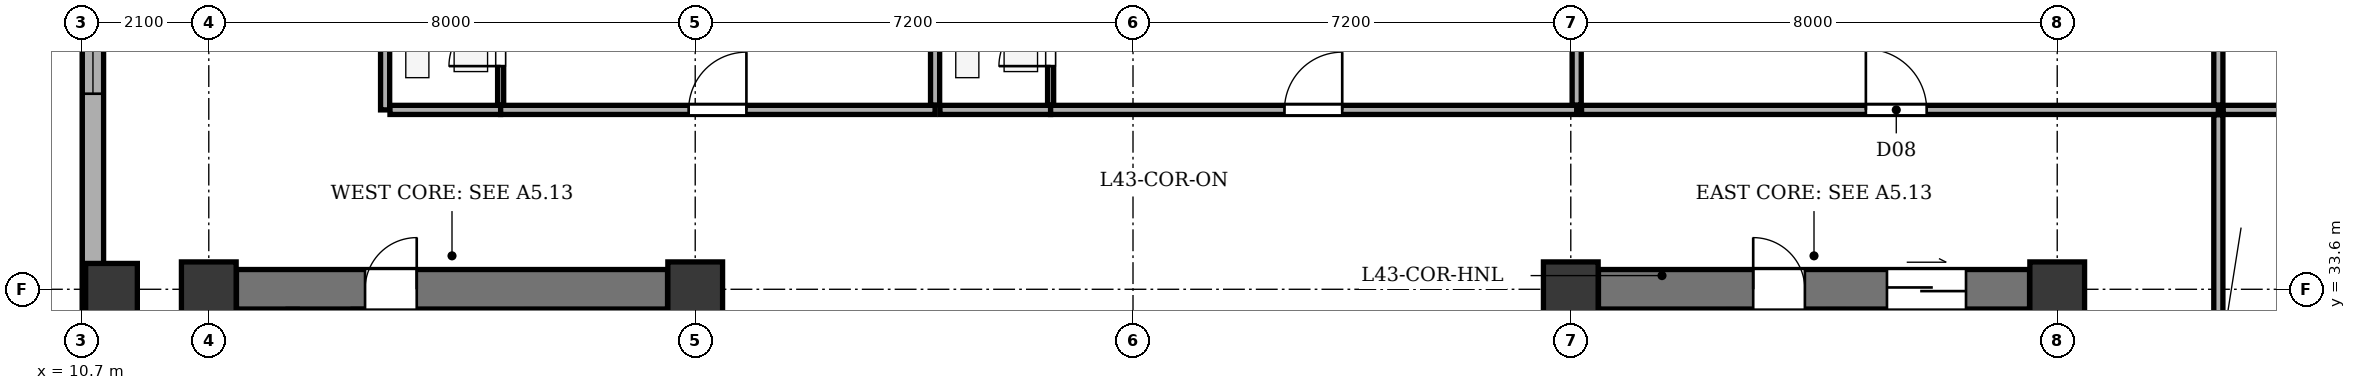
"""IFC4 building model, lengths in metres.
Left out: names, types, materials, properties, quantities, classifications, styles, units other than length and angle.
Written with IfcOpenShell. Run it as: python <this file> out.ifc"""

import sys

from ifc_helpers import new_model, si_unit, direction, frame, frame_2d, origin, origin_2d, place, context, subcontext, project, spatial, rectangle, extrude, element, fill, save


model = new_model("IFC4")
c1 = context("Model", 3, precision=1e-05, world=origin(), true_north=direction((0.0, 1.0)))
c2 = subcontext(c1, "Body", "Model", "MODEL_VIEW")
j1 = project(units=[si_unit("LENGTHUNIT", "METRE"), si_unit("PLANEANGLEUNIT", "RADIAN")], contexts=[c1])
p1 = place(None, origin())
s1 = spatial("IfcSite", under=j1, at=p1, CompositionType="ELEMENT")
p2 = place(p1, origin())
s2 = spatial("IfcBuilding", under=s1, at=p2, CompositionType="ELEMENT")
p3 = place(p2, frame((0.0, 0.0, 169.3)))
s3 = spatial("IfcBuildingStorey", under=s2, at=p3, CompositionType="ELEMENT", Elevation=169.3)
for number, where, z_axis, x_axis in (
    (1, (12.8, 33.6, 0.0), (0.0, 0.0, 1.0), (1.0, 0.0, 0.0)),
    (2, (20.8, 33.6, 0.0), (0.0, 0.0, 1.0), (1.0, 0.0, 0.0)),
    (3, (35.2, 33.6, 0.0), (0.0, 0.0, 1.0), (1.0, 0.0, 0.0)),
    (4, (43.2, 33.6, 0.0), (0.0, 0.0, 1.0), (1.0, 0.0, 0.0)),
):
    element("IfcColumn", number, at=place(p3, frame(where, z_axis=z_axis, x_axis=x_axis)), inside=s3, PredefinedType="COLUMN", context=c2, shape_type="SweptSolid", body=[
        extrude(rectangle(XDim=0.9, YDim=0.9, at=origin_2d()), origin(), (0.0, 0.0, 1.0), 3.5),
    ])
p4 = place(p3, frame((11.2, 33.6, 0.0), z_axis=(0.0, 0.0, 1.0), x_axis=(1.0, 0.0, 0.0)))
e5 = element("IfcColumn", 5, at=p4, inside=s3, PredefinedType="COLUMN", context=c2, shape_type="SweptSolid", body=[
    extrude(rectangle(XDim=0.85, YDim=0.85, at=origin_2d()), origin(), (0.0, 0.0, 1.0), 3.5),
])
p5 = place(p3, frame((10.895, 12.9, 0.0), z_axis=(0.0, 0.0, 1.0), x_axis=(0.0, 1.0, 0.0)))
e6 = element("IfcWall", 6, at=p5, inside=s3, PredefinedType="STANDARD", context=c2, shape_type="SweptSolid", body=[
    extrude(rectangle(XDim=35.0, YDim=0.35, at=frame_2d((17.5, 0.0))), origin(), (0.0, 0.0, 1.0), 2.785),
])
p6 = place(p5, frame((1.652, 0.0, 0.75)))
e7 = element("IfcOpeningElement", 7, at=p6, cuts=e6, PredefinedType="OPENING", context=c2, shape_type="SweptSolid", body=[
    extrude(rectangle(XDim=1.6, YDim=1.75, at=frame_2d((0.8, 0.875))), frame((0.0, 0.185, 0.0), z_axis=(0.0, -1.0, 0.0), x_axis=(1.0, 0.0, 0.0)), (0.0, 0.0, 1.0), 0.37),
])
p7 = place(p5, frame((4.748, 0.0, 0.75)))
e8 = element("IfcOpeningElement", 8, at=p7, cuts=e6, PredefinedType="OPENING", context=c2, shape_type="SweptSolid", body=[
    extrude(rectangle(XDim=1.6, YDim=1.75, at=frame_2d((0.8, 0.875))), frame((0.0, 0.185, 0.0), z_axis=(0.0, -1.0, 0.0), x_axis=(1.0, 0.0, 0.0)), (0.0, 0.0, 1.0), 0.37),
])
p8 = place(p5, frame((10.752, 0.0, 0.75)))
e9 = element("IfcOpeningElement", 9, at=p8, cuts=e6, PredefinedType="OPENING", context=c2, shape_type="SweptSolid", body=[
    extrude(rectangle(XDim=1.6, YDim=1.75, at=frame_2d((0.8, 0.875))), frame((0.0, 0.185, 0.0), z_axis=(0.0, -1.0, 0.0), x_axis=(1.0, 0.0, 0.0)), (0.0, 0.0, 1.0), 0.37),
])
p9 = place(p5, frame((15.998, 0.0, 0.75)))
e10 = element("IfcOpeningElement", 10, at=p9, cuts=e6, PredefinedType="OPENING", context=c2, shape_type="SweptSolid", body=[
    extrude(rectangle(XDim=2.1, YDim=1.75, at=frame_2d((1.05, 0.875))), frame((0.0, 0.185, 0.0), z_axis=(0.0, -1.0, 0.0), x_axis=(1.0, 0.0, 0.0)), (0.0, 0.0, 1.0), 0.37),
])
p10 = place(p5, frame((23.916, 0.0, 0.75)))
e11 = element("IfcOpeningElement", 11, at=p10, cuts=e6, PredefinedType="OPENING", context=c2, shape_type="SweptSolid", body=[
    extrude(rectangle(XDim=1.6, YDim=1.75, at=frame_2d((0.8, 0.875))), frame((0.0, 0.185, 0.0), z_axis=(0.0, -1.0, 0.0), x_axis=(1.0, 0.0, 0.0)), (0.0, 0.0, 1.0), 0.37),
])
p11 = place(p5, frame((29.834, 0.0, 0.75)))
e12 = element("IfcOpeningElement", 12, at=p11, cuts=e6, PredefinedType="OPENING", context=c2, shape_type="SweptSolid", body=[
    extrude(rectangle(XDim=2.1, YDim=1.75, at=frame_2d((1.05, 0.875))), frame((0.0, 0.185, 0.0), z_axis=(0.0, -1.0, 0.0), x_axis=(1.0, 0.0, 0.0)), (0.0, 0.0, 1.0), 0.37),
])
p12 = place(p3, frame((13.255, 33.6, 0.0), z_axis=(0.0, 0.0, 1.0), x_axis=(1.0, 0.0, 0.0)))
e13 = element("IfcWall", 13, at=p12, inside=s3, PredefinedType="SHEAR", context=c2, shape_type="SweptSolid", body=[
    extrude(rectangle(XDim=7.09, YDim=0.65, at=frame_2d((3.545, 0.0))), origin(), (0.0, 0.0, 1.0), 3.2),
])
p13 = place(p12, frame((2.115, 0.0, 0.0)))
e14 = element("IfcOpeningElement", 14, at=p13, cuts=e13, PredefinedType="OPENING", context=c2, shape_type="SweptSolid", body=[
    extrude(rectangle(XDim=0.85, YDim=2.02, at=frame_2d((0.425, 1.01))), frame((0.0, 0.335, 0.0), z_axis=(0.0, -1.0, 0.0), x_axis=(1.0, 0.0, 0.0)), (0.0, 0.0, 1.0), 0.67),
])
p14 = place(p3, frame((16.435, 21.135, 0.0), z_axis=(0.0, 0.0, 1.0), x_axis=(0.0, 1.0, 0.0)))
e15 = element("IfcWall", 15, at=p14, inside=s3, PredefinedType="SHEAR", context=c2, shape_type="SweptSolid", body=[
    extrude(rectangle(XDim=12.13, YDim=0.25, at=frame_2d((6.065, 0.0))), origin(), (0.0, 0.0, 1.0), 3.2),
])
p15 = place(p14, frame((0.515, 0.0, 0.0)))
e16 = element("IfcOpeningElement", 16, at=p15, cuts=e15, PredefinedType="OPENING", context=c2, shape_type="SweptSolid", body=[
    extrude(rectangle(XDim=1.2, YDim=2.15, at=frame_2d((0.6, 1.075))), frame((0.0, 0.135, 0.0), z_axis=(0.0, -1.0, 0.0), x_axis=(1.0, 0.0, 0.0)), (0.0, 0.0, 1.0), 0.27),
])
p16 = place(p14, frame((2.665, 0.0, 0.0)))
e17 = element("IfcOpeningElement", 17, at=p16, cuts=e15, PredefinedType="OPENING", context=c2, shape_type="SweptSolid", body=[
    extrude(rectangle(XDim=1.15, YDim=2.15, at=frame_2d((0.575, 1.075))), frame((0.0, 0.135, 0.0), z_axis=(0.0, -1.0, 0.0), x_axis=(1.0, 0.0, 0.0)), (0.0, 0.0, 1.0), 0.27),
])
p17 = place(p3, frame((18.12, 31.17, 0.0), z_axis=(0.0, 0.0, 1.0), x_axis=(0.0, 1.0, 0.0)))
e18 = element("IfcWall", 18, at=p17, inside=s3, PredefinedType="PARTITIONING", context=c2, shape_type="SweptSolid", body=[
    extrude(rectangle(XDim=2.095, YDim=0.18, at=frame_2d((1.047, 0.0))), origin(), (0.0, 0.0, 1.0), 3.2),
])
p18 = place(p3, frame((35.655, 33.6, 0.0), z_axis=(0.0, 0.0, 1.0), x_axis=(1.0, 0.0, 0.0)))
e19 = element("IfcWall", 19, at=p18, inside=s3, PredefinedType="SHEAR", context=c2, shape_type="SweptSolid", body=[
    extrude(rectangle(XDim=7.09, YDim=0.65, at=frame_2d((3.545, 0.0))), origin(), (0.0, 0.0, 1.0), 3.2),
])
p19 = place(p18, frame((4.745, 0.0, 0.0)))
e20 = element("IfcOpeningElement", 20, at=p19, cuts=e19, PredefinedType="OPENING", context=c2, shape_type="SweptSolid", body=[
    extrude(rectangle(XDim=1.3, YDim=2.15, at=frame_2d((0.65, 1.075))), frame((0.0, 0.335, 0.0), z_axis=(0.0, -1.0, 0.0), x_axis=(1.0, 0.0, 0.0)), (0.0, 0.0, 1.0), 0.67),
])
p20 = place(p18, frame((2.545, 0.0, 0.0)))
e21 = element("IfcOpeningElement", 21, at=p20, cuts=e19, PredefinedType="OPENING", context=c2, shape_type="SweptSolid", body=[
    extrude(rectangle(XDim=0.85, YDim=2.02, at=frame_2d((0.425, 1.01))), frame((0.0, 0.335, 0.0), z_axis=(0.0, -1.0, 0.0), x_axis=(1.0, 0.0, 0.0)), (0.0, 0.0, 1.0), 0.67),
])
p21 = place(p3, frame((39.565, 21.135, 0.0), z_axis=(0.0, 0.0, 1.0), x_axis=(0.0, 1.0, 0.0)))
e22 = element("IfcWall", 22, at=p21, inside=s3, PredefinedType="SHEAR", context=c2, shape_type="SweptSolid", body=[
    extrude(rectangle(XDim=12.13, YDim=0.25, at=frame_2d((6.065, 0.0))), origin(), (0.0, 0.0, 1.0), 3.2),
])
p22 = place(p21, frame((0.515, 0.0, 0.0)))
e23 = element("IfcOpeningElement", 23, at=p22, cuts=e22, PredefinedType="OPENING", context=c2, shape_type="SweptSolid", body=[
    extrude(rectangle(XDim=1.2, YDim=2.15, at=frame_2d((0.6, 1.075))), frame((0.0, 0.135, 0.0), z_axis=(0.0, -1.0, 0.0), x_axis=(1.0, 0.0, 0.0)), (0.0, 0.0, 1.0), 0.27),
])
p23 = place(p21, frame((2.665, 0.0, 0.0)))
e24 = element("IfcOpeningElement", 24, at=p23, cuts=e22, PredefinedType="OPENING", context=c2, shape_type="SweptSolid", body=[
    extrude(rectangle(XDim=1.15, YDim=2.15, at=frame_2d((0.575, 1.075))), frame((0.0, 0.135, 0.0), z_axis=(0.0, -1.0, 0.0), x_axis=(1.0, 0.0, 0.0)), (0.0, 0.0, 1.0), 0.27),
])
p24 = place(p3, frame((37.9, 25.27, 0.0), z_axis=(0.0, 0.0, 1.0), x_axis=(0.0, 1.0, 0.0)))
e25 = element("IfcWall", 25, at=p24, inside=s3, PredefinedType="SOLIDWALL", context=c2, shape_type="SweptSolid", body=[
    extrude(rectangle(XDim=7.995, YDim=0.2, at=frame_2d((3.998, 0.0))), origin(), (0.0, 0.0, 1.0), 3.2),
])
p25 = place(p3, frame((14.18, 30.96, 0.0), z_axis=(0.0, 0.0, 1.0), x_axis=(0.0, 1.0, 0.0)))
e26 = element("IfcWall", 26, at=p25, inside=s3, PredefinedType="PARTITIONING", context=c2, shape_type="SweptSolid", body=[
    extrude(rectangle(XDim=2.31, YDim=0.15, at=frame_2d((1.155, 0.0))), origin(), (0.0, 0.0, 1.0), 3.2),
])
p26 = place(p25, frame((0.47, 0.0, 0.0)))
e27 = element("IfcOpeningElement", 27, at=p26, cuts=e26, PredefinedType="OPENING", context=c2, shape_type="SweptSolid", body=[
    extrude(rectangle(XDim=0.85, YDim=2.02, at=frame_2d((0.425, 1.01))), frame((0.0, 0.085, 0.0), z_axis=(0.0, -1.0, 0.0), x_axis=(1.0, 0.0, 0.0)), (0.0, 0.0, 1.0), 0.17),
])
p27 = place(p3, frame((15.25, 30.96, 0.0), z_axis=(0.0, 0.0, 1.0), x_axis=(0.0, 1.0, 0.0)))
e28 = element("IfcWall", 28, at=p27, inside=s3, PredefinedType="PARTITIONING", context=c2, shape_type="SweptSolid", body=[
    extrude(rectangle(XDim=2.31, YDim=0.15, at=frame_2d((1.155, 0.0))), origin(), (0.0, 0.0, 1.0), 3.2),
])
p28 = place(p27, frame((0.47, 0.0, 0.0)))
e29 = element("IfcOpeningElement", 29, at=p28, cuts=e28, PredefinedType="OPENING", context=c2, shape_type="SweptSolid", body=[
    extrude(rectangle(XDim=0.85, YDim=2.02, at=frame_2d((0.425, 1.01))), frame((0.0, 0.085, 0.0), z_axis=(0.0, -1.0, 0.0), x_axis=(1.0, 0.0, 0.0)), (0.0, 0.0, 1.0), 0.17),
])
p29 = place(p3, frame((15.7, 36.55, 0.0), z_axis=(0.0, 0.0, 1.0), x_axis=(0.0, 1.0, 0.0)))
e30 = element("IfcWall", 30, at=p29, inside=s3, PredefinedType="PARTITIONING", context=c2, shape_type="SweptSolid", body=[
    extrude(rectangle(XDim=15.975, YDim=0.15, at=frame_2d((7.987, 0.0))), origin(), (0.0, 0.0, 1.0), 3.2),
])
p30 = place(p3, frame((15.78, 36.55, 0.0), z_axis=(0.0, 0.0, 1.0), x_axis=(1.0, 0.0, 0.0)))
e31 = element("IfcWall", 31, at=p30, inside=s3, PredefinedType="PARTITIONING", context=c2, shape_type="SweptSolid", body=[
    extrude(rectangle(XDim=1.82, YDim=0.15, at=frame_2d((0.91, 0.0))), origin(), (0.0, 0.0, 1.0), 3.2),
])
p31 = place(p3, frame((17.6, 36.55, 0.0), z_axis=(0.0, 0.0, 1.0), x_axis=(1.0, 0.0, 0.0)))
e32 = element("IfcWall", 32, at=p31, inside=s3, PredefinedType="PARTITIONING", context=c2, shape_type="SweptSolid", body=[
    extrude(rectangle(XDim=7.145, YDim=0.15, at=frame_2d((3.573, 0.0))), origin(), (0.0, 0.0, 1.0), 3.2),
])
p32 = place(p31, frame((3.092, 0.0, 0.0)))
e33 = element("IfcOpeningElement", 33, at=p32, cuts=e32, PredefinedType="OPENING", context=c2, shape_type="SweptSolid", body=[
    extrude(rectangle(XDim=0.95, YDim=2.1, at=frame_2d((0.475, 1.05))), frame((0.0, 0.085, 0.0), z_axis=(0.0, -1.0, 0.0), x_axis=(1.0, 0.0, 0.0)), (0.0, 0.0, 1.0), 0.17),
])
p33 = place(p3, frame((17.6, 36.63, 0.0), z_axis=(0.0, 0.0, 1.0), x_axis=(0.0, 1.0, 0.0)))
e34 = element("IfcWall", 34, at=p33, inside=s3, PredefinedType="PARTITIONING", context=c2, shape_type="SweptSolid", body=[
    extrude(rectangle(XDim=2.25, YDim=0.1, at=frame_2d((1.125, 0.0))), origin(), (0.0, 0.0, 1.0), 3.2),
])
p34 = place(p33, frame((0.64, 0.0, 0.0)))
e35 = element("IfcOpeningElement", 35, at=p34, cuts=e34, PredefinedType="OPENING", context=c2, shape_type="SweptSolid", body=[
    extrude(rectangle(XDim=0.85, YDim=2.05, at=frame_2d((0.425, 1.025))), frame((0.0, 0.06, 0.0), z_axis=(0.0, -1.0, 0.0), x_axis=(1.0, 0.0, 0.0)), (0.0, 0.0, 1.0), 0.12),
])
p35 = place(p3, frame((24.745, 36.63, 0.0), z_axis=(0.0, 0.0, 1.0), x_axis=(0.0, 1.0, 0.0)))
e36 = element("IfcWall", 36, at=p35, inside=s3, PredefinedType="PARTITIONING", context=c2, shape_type="SweptSolid", body=[
    extrude(rectangle(XDim=15.895, YDim=0.15, at=frame_2d((7.948, 0.0))), origin(), (0.0, 0.0, 1.0), 3.2),
])
p36 = place(p3, frame((24.825, 36.55, 0.0), z_axis=(0.0, 0.0, 1.0), x_axis=(1.0, 0.0, 0.0)))
e37 = element("IfcWall", 37, at=p36, inside=s3, PredefinedType="PARTITIONING", context=c2, shape_type="SweptSolid", body=[
    extrude(rectangle(XDim=1.82, YDim=0.15, at=frame_2d((0.91, 0.0))), origin(), (0.0, 0.0, 1.0), 3.2),
])
p37 = place(p3, frame((26.645, 36.55, 0.0), z_axis=(0.0, 0.0, 1.0), x_axis=(1.0, 0.0, 0.0)))
e38 = element("IfcWall", 38, at=p37, inside=s3, PredefinedType="PARTITIONING", context=c2, shape_type="SweptSolid", body=[
    extrude(rectangle(XDim=8.652, YDim=0.15, at=frame_2d((4.326, 0.0))), origin(), (0.0, 0.0, 1.0), 3.2),
])
p38 = place(p37, frame((3.846, 0.0, 0.0)))
e39 = element("IfcOpeningElement", 39, at=p38, cuts=e38, PredefinedType="OPENING", context=c2, shape_type="SweptSolid", body=[
    extrude(rectangle(XDim=0.95, YDim=2.1, at=frame_2d((0.475, 1.05))), frame((0.0, 0.085, 0.0), z_axis=(0.0, -1.0, 0.0), x_axis=(1.0, 0.0, 0.0)), (0.0, 0.0, 1.0), 0.17),
])
p39 = place(p3, frame((26.645, 36.63, 0.0), z_axis=(0.0, 0.0, 1.0), x_axis=(0.0, 1.0, 0.0)))
e40 = element("IfcWall", 40, at=p39, inside=s3, PredefinedType="PARTITIONING", context=c2, shape_type="SweptSolid", body=[
    extrude(rectangle(XDim=2.25, YDim=0.1, at=frame_2d((1.125, 0.0))), origin(), (0.0, 0.0, 1.0), 3.2),
])
p40 = place(p39, frame((0.64, 0.0, 0.0)))
e41 = element("IfcOpeningElement", 41, at=p40, cuts=e40, PredefinedType="OPENING", context=c2, shape_type="SweptSolid", body=[
    extrude(rectangle(XDim=0.85, YDim=2.05, at=frame_2d((0.425, 1.025))), frame((0.0, 0.06, 0.0), z_axis=(0.0, -1.0, 0.0), x_axis=(1.0, 0.0, 0.0)), (0.0, 0.0, 1.0), 0.12),
])
p41 = place(p3, frame((35.297, 36.63, 0.0), z_axis=(0.0, 0.0, 1.0), x_axis=(0.0, 1.0, 0.0)))
e42 = element("IfcWall", 42, at=p41, inside=s3, PredefinedType="PARTITIONING", context=c2, shape_type="SweptSolid", body=[
    extrude(rectangle(XDim=15.895, YDim=0.15, at=frame_2d((7.948, 0.0))), origin(), (0.0, 0.0, 1.0), 2.535),
])
p42 = place(p3, frame((35.377, 36.55, 0.0), z_axis=(0.0, 0.0, 1.0), x_axis=(1.0, 0.0, 0.0)))
e43 = element("IfcWall", 43, at=p42, inside=s3, PredefinedType="PARTITIONING", context=c2, shape_type="SweptSolid", body=[
    extrude(rectangle(XDim=10.473, YDim=0.15, at=frame_2d((5.237, 0.0))), origin(), (0.0, 0.0, 1.0), 3.2),
])
p43 = place(p42, frame((4.676, 0.0, 0.0)))
e44 = element("IfcOpeningElement", 44, at=p43, cuts=e43, PredefinedType="OPENING", context=c2, shape_type="SweptSolid", body=[
    extrude(rectangle(XDim=1.0, YDim=2.1, at=frame_2d((0.5, 1.05))), frame((0.0, 0.085, 0.0), z_axis=(0.0, -1.0, 0.0), x_axis=(1.0, 0.0, 0.0)), (0.0, 0.0, 1.0), 0.17),
])
p44 = place(p3, frame((45.85, 36.63, 0.0), z_axis=(0.0, 0.0, 1.0), x_axis=(0.0, 1.0, 0.0)))
e45 = element("IfcWall", 45, at=p44, inside=s3, PredefinedType="PARTITIONING", context=c2, shape_type="SweptSolid", body=[
    extrude(rectangle(XDim=15.895, YDim=0.15, at=frame_2d((7.948, 0.0))), origin(), (0.0, 0.0, 1.0), 3.2),
])
p45 = place(p3, frame((45.93, 36.55, 0.0), z_axis=(0.0, 0.0, 1.0), x_axis=(1.0, 0.0, 0.0)))
e46 = element("IfcWall", 46, at=p45, inside=s3, PredefinedType="PARTITIONING", context=c2, shape_type="SweptSolid", body=[
    extrude(rectangle(XDim=9.395, YDim=0.15, at=frame_2d((4.698, 0.0))), origin(), (0.0, 0.0, 1.0), 3.2),
])
p46 = place(p3, frame((45.85, 17.93, 0.0), z_axis=(0.0, 0.0, 1.0), x_axis=(0.0, 1.0, 0.0)))
e47 = element("IfcWall", 47, at=p46, inside=s3, PredefinedType="PARTITIONING", context=c2, shape_type="SweptSolid", body=[
    extrude(rectangle(XDim=18.54, YDim=0.15, at=frame_2d((9.27, 0.0))), origin(), (0.0, 0.0, 1.0), 3.2),
])
p47 = place(p46, frame((8.79, 0.0, 0.0)))
e48 = element("IfcOpeningElement", 48, at=p47, cuts=e47, PredefinedType="OPENING", context=c2, shape_type="SweptSolid", body=[
    extrude(rectangle(XDim=0.95, YDim=2.1, at=frame_2d((0.475, 1.05))), frame((0.0, 0.085, 0.0), z_axis=(0.0, -1.0, 0.0), x_axis=(1.0, 0.0, 0.0)), (0.0, 0.0, 1.0), 0.17),
])
p48 = place(p10, origin())
e49 = element("IfcWindow", 49, at=p48, inside=s3, PartitioningType="SINGLE_PANEL", PredefinedType="WINDOW", context=c2, shape_type="SweptSolid", body=[
    extrude(rectangle(XDim=1.6, YDim=1.75, at=frame_2d((0.8, 0.875))), frame((0.0, -0.01, 0.0), z_axis=(0.0, -1.0, 0.0), x_axis=(1.0, 0.0, 0.0)), (0.0, 0.0, 1.0), 0.06),
])
fill(e11, e49)
p49 = place(p13, origin())
e50 = element("IfcDoor", 50, at=p49, inside=s3, OperationType="SINGLE_SWING_RIGHT", PredefinedType="DOOR", context=c2, shape_type="SweptSolid", body=[
    extrude(rectangle(XDim=0.85, YDim=2.02, at=frame_2d((0.425, 1.01))), frame((0.0, 0.025, 0.0), z_axis=(0.0, -1.0, 0.0), x_axis=(1.0, 0.0, 0.0)), (0.0, 0.0, 1.0), 0.05),
])
fill(e14, e50)
p50 = place(p19, origin())
e51 = element("IfcDoor", 51, at=p50, inside=s3, OperationType="DOUBLE_DOOR_SLIDING", PredefinedType="DOOR", context=c2, shape_type="SweptSolid", body=[
    extrude(rectangle(XDim=1.3, YDim=2.15, at=frame_2d((0.65, 1.075))), frame((0.0, 0.025, 0.0), z_axis=(0.0, -1.0, 0.0), x_axis=(1.0, 0.0, 0.0)), (0.0, 0.0, 1.0), 0.05),
])
fill(e20, e51)
p51 = place(p20, origin())
e52 = element("IfcDoor", 52, at=p51, inside=s3, OperationType="SINGLE_SWING_LEFT", PredefinedType="DOOR", context=c2, shape_type="SweptSolid", body=[
    extrude(rectangle(XDim=0.85, YDim=2.02, at=frame_2d((0.425, 1.01))), frame((0.0, 0.025, 0.0), z_axis=(0.0, -1.0, 0.0), x_axis=(1.0, 0.0, 0.0)), (0.0, 0.0, 1.0), 0.05),
])
fill(e21, e52)
p52 = place(p34, origin())
e53 = element("IfcDoor", 53, at=p52, inside=s3, OperationType="SINGLE_SWING_LEFT", PredefinedType="DOOR", context=c2, shape_type="SweptSolid", body=[
    extrude(rectangle(XDim=0.85, YDim=2.05, at=frame_2d((0.425, 1.025))), frame((0.0, 0.025, 0.0), z_axis=(0.0, -1.0, 0.0), x_axis=(1.0, 0.0, 0.0)), (0.0, 0.0, 1.0), 0.05),
])
fill(e35, e53)
p53 = place(p32, origin())
e54 = element("IfcDoor", 54, at=p53, inside=s3, OperationType="SINGLE_SWING_RIGHT", PredefinedType="DOOR", context=c2, shape_type="SweptSolid", body=[
    extrude(rectangle(XDim=0.95, YDim=2.1, at=frame_2d((0.475, 1.05))), frame((0.0, 0.025, 0.0), z_axis=(0.0, -1.0, 0.0), x_axis=(1.0, 0.0, 0.0)), (0.0, 0.0, 1.0), 0.05),
])
fill(e33, e54)
p54 = place(p40, origin())
e55 = element("IfcDoor", 55, at=p54, inside=s3, OperationType="SINGLE_SWING_LEFT", PredefinedType="DOOR", context=c2, shape_type="SweptSolid", body=[
    extrude(rectangle(XDim=0.85, YDim=2.05, at=frame_2d((0.425, 1.025))), frame((0.0, 0.025, 0.0), z_axis=(0.0, -1.0, 0.0), x_axis=(1.0, 0.0, 0.0)), (0.0, 0.0, 1.0), 0.05),
])
fill(e41, e55)
p55 = place(p38, origin())
e56 = element("IfcDoor", 56, at=p55, inside=s3, OperationType="SINGLE_SWING_RIGHT", PredefinedType="DOOR", context=c2, shape_type="SweptSolid", body=[
    extrude(rectangle(XDim=0.95, YDim=2.1, at=frame_2d((0.475, 1.05))), frame((0.0, 0.025, 0.0), z_axis=(0.0, -1.0, 0.0), x_axis=(1.0, 0.0, 0.0)), (0.0, 0.0, 1.0), 0.05),
])
fill(e39, e56)
p56 = place(p43, origin())
e57 = element("IfcDoor", 57, at=p56, inside=s3, OperationType="SINGLE_SWING_LEFT", PredefinedType="DOOR", context=c2, shape_type="SweptSolid", body=[
    extrude(rectangle(XDim=1.0, YDim=2.1, at=frame_2d((0.5, 1.05))), frame((0.0, 0.025, 0.0), z_axis=(0.0, -1.0, 0.0), x_axis=(1.0, 0.0, 0.0)), (0.0, 0.0, 1.0), 0.05),
])
fill(e44, e57)
save(model, sys.argv[1])
